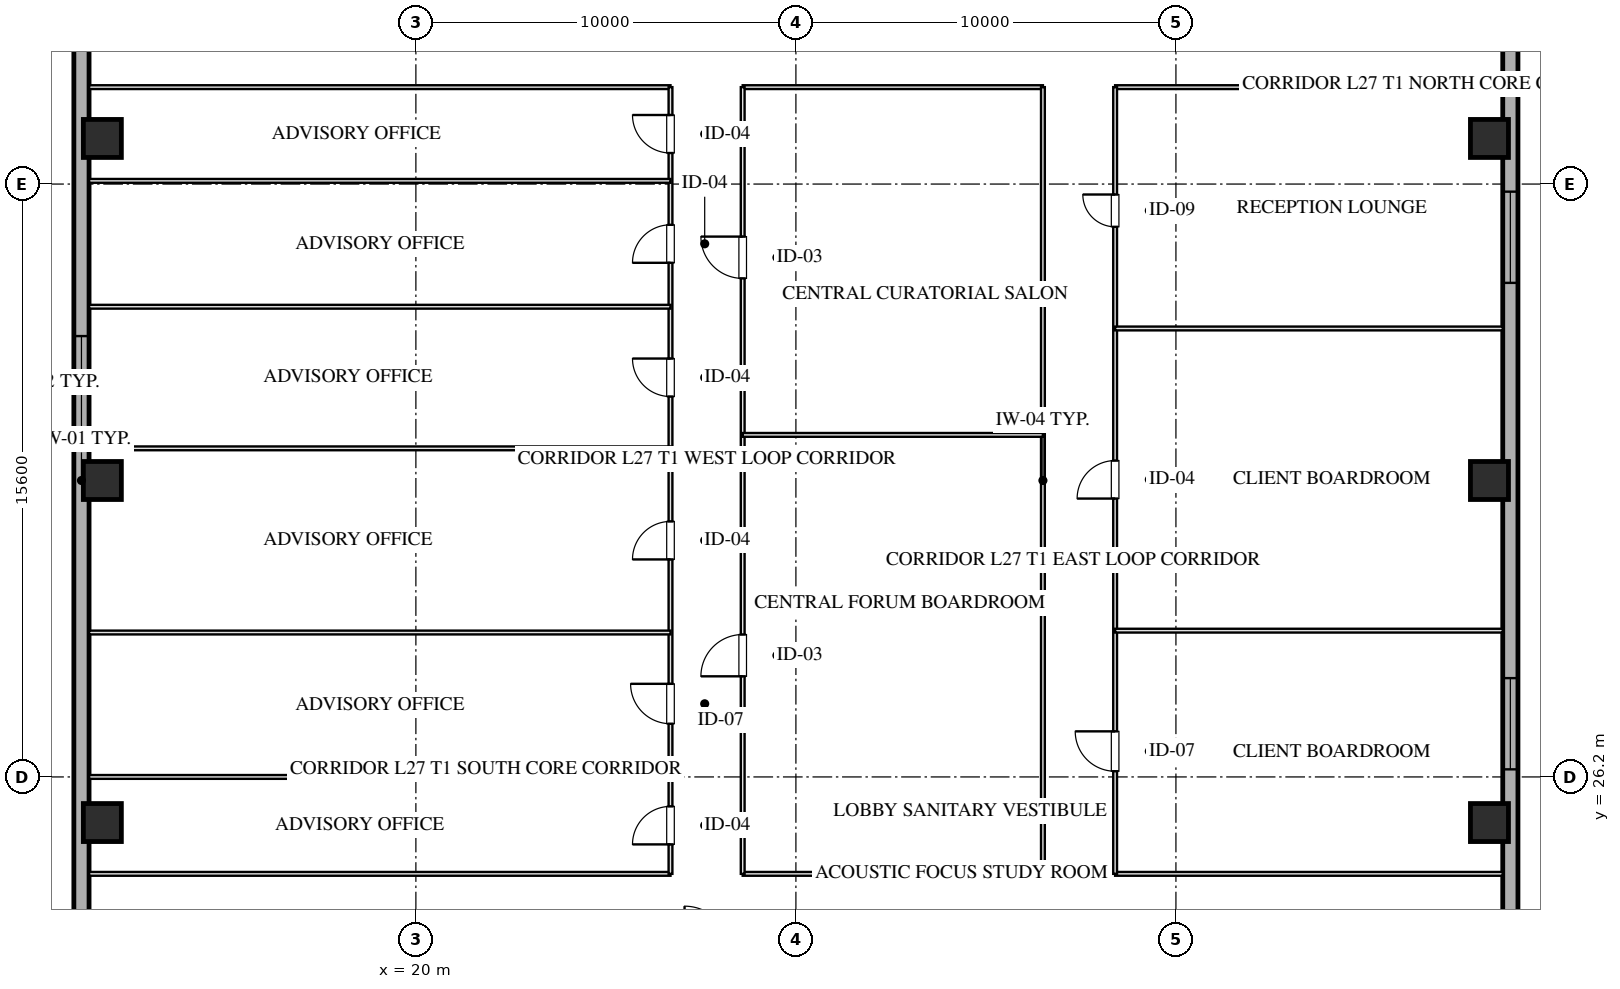
"""IFC4 building model, lengths in metres.
Left out: names, types, materials, properties, quantities, classifications, styles, units other than length and angle.
Written with IfcOpenShell. Run it as: python <this file> out.ifc"""

import sys

from ifc_helpers import new_model, si_unit, direction, frame, frame_2d, origin, origin_2d, place, context, subcontext, project, spatial, rectangle, hollow_rectangle, extrude, element, fill, save


model = new_model("IFC4")
c1 = context("Model", 3, precision=1e-05, world=origin(), true_north=direction((0.0, 1.0)))
c2 = subcontext(c1, "Body", "Model", "MODEL_VIEW")
j1 = project(units=[si_unit("LENGTHUNIT", "METRE"), si_unit("PLANEANGLEUNIT", "RADIAN")], contexts=[c1])
p1 = place(None, origin())
s1 = spatial("IfcSite", under=j1, at=p1, CompositionType="ELEMENT")
p2 = place(p1, origin())
s2 = spatial("IfcBuilding", under=s1, at=p2, CompositionType="ELEMENT")
p3 = place(p2, frame((0.0, 0.0, 106.95)))
s3 = spatial("IfcBuildingStorey", under=s2, at=p3, CompositionType="ELEMENT", Elevation=106.95)
for number, where, z_axis, x_axis in (
    (1, (11.75, 25.0, 0.0), (0.0, 0.0, 1.0), (1.0, 0.0, 0.0)),
    (2, (11.75, 34.0, 0.0), (0.0, 0.0, 1.0), (1.0, 0.0, 0.0)),
    (3, (11.75, 43.0, 0.0), (0.0, 0.0, 1.0), (1.0, 0.0, 0.0)),
    (4, (48.25, 25.0, 0.0), (0.0, 0.0, 1.0), (1.0, 0.0, 0.0)),
    (5, (48.25, 34.0, 0.0), (0.0, 0.0, 1.0), (1.0, 0.0, 0.0)),
    (6, (48.25, 43.0, 0.0), (0.0, 0.0, 1.0), (1.0, 0.0, 0.0)),
):
    element("IfcColumn", number, at=place(p3, frame(where, z_axis=z_axis, x_axis=x_axis)), inside=s3, PredefinedType="COLUMN", context=c2, shape_type="SweptSolid", body=[
        extrude(hollow_rectangle(XDim=1.0, YDim=1.0, WallThickness=0.036, at=origin_2d()), origin(), (0.0, 0.0, 1.0), 3.451),
    ])
p4 = place(p3, frame((11.2, 9.0, 0.0), z_axis=(0.0, 0.0, 1.0), x_axis=(0.0, 1.0, 0.0)))
e7 = element("IfcWall", 7, at=p4, inside=s3, PredefinedType="SOLIDWALL", context=c2, shape_type="SweptSolid", body=[
    extrude(rectangle(XDim=50.0, YDim=0.4, at=frame_2d((25.0, 0.0))), origin(), (0.0, 0.0, 1.0), 2.61),
])
p5 = place(p4, frame((26.4, 0.0, 0.75)))
e8 = element("IfcOpeningElement", 8, at=p5, cuts=e7, PredefinedType="OPENING", context=c2, shape_type="SweptSolid", body=[
    extrude(rectangle(XDim=2.4, YDim=1.46, at=frame_2d((1.2, 0.73))), frame((0.0, 0.21, 0.0), z_axis=(0.0, -1.0, 0.0), x_axis=(1.0, 0.0, 0.0)), (0.0, 0.0, 1.0), 0.42),
])
p6 = place(p3, frame((48.8, 59.0, 0.0), z_axis=(0.0, 0.0, 1.0), x_axis=(0.0, -1.0, 0.0)))
e9 = element("IfcWall", 9, at=p6, inside=s3, PredefinedType="SOLIDWALL", context=c2, shape_type="SweptSolid", body=[
    extrude(rectangle(XDim=50.0, YDim=0.4, at=frame_2d((25.0, 0.0))), origin(), (0.0, 0.0, 1.0), 2.61),
])
p7 = place(p6, frame((30.2, 0.0, 0.75)))
e10 = element("IfcOpeningElement", 10, at=p7, cuts=e9, PredefinedType="OPENING", context=c2, shape_type="SweptSolid", body=[
    extrude(rectangle(XDim=2.4, YDim=1.46, at=frame_2d((1.2, 0.73))), frame((0.0, 0.21, 0.0), z_axis=(0.0, -1.0, 0.0), x_axis=(1.0, 0.0, 0.0)), (0.0, 0.0, 1.0), 0.42),
])
p8 = place(p6, frame((17.4, 0.0, 0.75)))
e11 = element("IfcOpeningElement", 11, at=p8, cuts=e9, PredefinedType="OPENING", context=c2, shape_type="SweptSolid", body=[
    extrude(rectangle(XDim=2.4, YDim=1.46, at=frame_2d((1.2, 0.73))), frame((0.0, 0.21, 0.0), z_axis=(0.0, -1.0, 0.0), x_axis=(1.0, 0.0, 0.0)), (0.0, 0.0, 1.0), 0.42),
])
p9 = place(p3, frame((11.4, 23.65, 0.0), z_axis=(0.0, 0.0, 1.0), x_axis=(1.0, 0.0, 0.0)))
e12 = element("IfcWall", 12, at=p9, inside=s3, PredefinedType="MOVABLE", context=c2, shape_type="SweptSolid", body=[
    extrude(rectangle(XDim=15.3, YDim=0.1, at=frame_2d((7.65, 0.0))), origin(), (0.0, 0.0, 1.0), 3.175),
])
p10 = place(p3, frame((28.6, 23.65, 0.0), z_axis=(0.0, 0.0, 1.0), x_axis=(1.0, 0.0, 0.0)))
e13 = element("IfcWall", 13, at=p10, inside=s3, PredefinedType="MOVABLE", context=c2, shape_type="SweptSolid", body=[
    extrude(rectangle(XDim=7.9, YDim=0.1, at=frame_2d((3.95, 0.0))), origin(), (0.0, 0.0, 1.0), 3.175),
])
p11 = place(p3, frame((38.4, 23.65, 0.0), z_axis=(0.0, 0.0, 1.0), x_axis=(1.0, 0.0, 0.0)))
e14 = element("IfcWall", 14, at=p11, inside=s3, PredefinedType="MOVABLE", context=c2, shape_type="SweptSolid", body=[
    extrude(rectangle(XDim=10.2, YDim=0.1, at=frame_2d((5.1, 0.0))), origin(), (0.0, 0.0, 1.0), 3.175),
])
p12 = place(p3, frame((11.4, 44.35, 0.0), z_axis=(0.0, 0.0, 1.0), x_axis=(1.0, 0.0, 0.0)))
e15 = element("IfcWall", 15, at=p12, inside=s3, PredefinedType="MOVABLE", context=c2, shape_type="SweptSolid", body=[
    extrude(rectangle(XDim=15.3, YDim=0.1, at=frame_2d((7.65, 0.0))), origin(), (0.0, 0.0, 1.0), 3.175),
])
p13 = place(p3, frame((28.6, 44.35, 0.0), z_axis=(0.0, 0.0, 1.0), x_axis=(1.0, 0.0, 0.0)))
e16 = element("IfcWall", 16, at=p13, inside=s3, PredefinedType="MOVABLE", context=c2, shape_type="SweptSolid", body=[
    extrude(rectangle(XDim=7.9, YDim=0.1, at=frame_2d((3.95, 0.0))), origin(), (0.0, 0.0, 1.0), 3.175),
])
p14 = place(p3, frame((38.4, 44.35, 0.0), z_axis=(0.0, 0.0, 1.0), x_axis=(1.0, 0.0, 0.0)))
e17 = element("IfcWall", 17, at=p14, inside=s3, PredefinedType="MOVABLE", context=c2, shape_type="SweptSolid", body=[
    extrude(rectangle(XDim=10.2, YDim=0.1, at=frame_2d((5.1, 0.0))), origin(), (0.0, 0.0, 1.0), 3.175),
])
p15 = place(p3, frame((26.7, 23.65, 0.0), z_axis=(0.0, 0.0, 1.0), x_axis=(0.0, 1.0, 0.0)))
e18 = element("IfcWall", 18, at=p15, inside=s3, PredefinedType="MOVABLE", context=c2, shape_type="SweptSolid", body=[
    extrude(rectangle(XDim=20.7, YDim=0.1, at=frame_2d((10.35, 0.0))), origin(), (0.0, 0.0, 1.0), 3.175),
])
p16 = place(p15, frame((0.775, 0.0, 0.0)))
e19 = element("IfcOpeningElement", 19, at=p16, cuts=e18, PredefinedType="OPENING", context=c2, shape_type="SweptSolid", body=[
    extrude(rectangle(XDim=1.0, YDim=2.05, at=frame_2d((0.5, 1.025))), frame((0.0, 0.06, 0.0), z_axis=(0.0, -1.0, 0.0), x_axis=(1.0, 0.0, 0.0)), (0.0, 0.0, 1.0), 0.12),
])
p17 = place(p15, frame((3.95, 0.0, 0.0)))
e20 = element("IfcOpeningElement", 20, at=p17, cuts=e18, PredefinedType="OPENING", context=c2, shape_type="SweptSolid", body=[
    extrude(rectangle(XDim=1.05, YDim=2.05, at=frame_2d((0.525, 1.025))), frame((0.0, 0.06, 0.0), z_axis=(0.0, -1.0, 0.0), x_axis=(1.0, 0.0, 0.0)), (0.0, 0.0, 1.0), 0.12),
])
p18 = place(p15, frame((8.273, 0.0, 0.0)))
e21 = element("IfcOpeningElement", 21, at=p18, cuts=e18, PredefinedType="OPENING", context=c2, shape_type="SweptSolid", body=[
    extrude(rectangle(XDim=1.0, YDim=2.05, at=frame_2d((0.5, 1.025))), frame((0.0, 0.06, 0.0), z_axis=(0.0, -1.0, 0.0), x_axis=(1.0, 0.0, 0.0)), (0.0, 0.0, 1.0), 0.12),
])
p19 = place(p15, frame((12.559, 0.0, 0.0)))
e22 = element("IfcOpeningElement", 22, at=p19, cuts=e18, PredefinedType="OPENING", context=c2, shape_type="SweptSolid", body=[
    extrude(rectangle(XDim=1.0, YDim=2.05, at=frame_2d((0.5, 1.025))), frame((0.0, 0.06, 0.0), z_axis=(0.0, -1.0, 0.0), x_axis=(1.0, 0.0, 0.0)), (0.0, 0.0, 1.0), 0.12),
])
p20 = place(p15, frame((16.078, 0.0, 0.0)))
e23 = element("IfcOpeningElement", 23, at=p20, cuts=e18, PredefinedType="OPENING", context=c2, shape_type="SweptSolid", body=[
    extrude(rectangle(XDim=1.0, YDim=2.05, at=frame_2d((0.5, 1.025))), frame((0.0, 0.06, 0.0), z_axis=(0.0, -1.0, 0.0), x_axis=(1.0, 0.0, 0.0)), (0.0, 0.0, 1.0), 0.12),
])
p21 = place(p15, frame((18.967, 0.0, 0.0)))
e24 = element("IfcOpeningElement", 24, at=p21, cuts=e18, PredefinedType="OPENING", context=c2, shape_type="SweptSolid", body=[
    extrude(rectangle(XDim=1.0, YDim=2.05, at=frame_2d((0.5, 1.025))), frame((0.0, 0.06, 0.0), z_axis=(0.0, -1.0, 0.0), x_axis=(1.0, 0.0, 0.0)), (0.0, 0.0, 1.0), 0.12),
])
p22 = place(p3, frame((28.6, 23.65, 0.0), z_axis=(0.0, 0.0, 1.0), x_axis=(0.0, 1.0, 0.0)))
e25 = element("IfcWall", 25, at=p22, inside=s3, PredefinedType="MOVABLE", context=c2, shape_type="SweptSolid", body=[
    extrude(rectangle(XDim=20.7, YDim=0.1, at=frame_2d((10.35, 0.0))), origin(), (0.0, 0.0, 1.0), 3.175),
])
p23 = place(p22, frame((5.198, 0.0, 0.0)))
e26 = element("IfcOpeningElement", 26, at=p23, cuts=e25, PredefinedType="OPENING", context=c2, shape_type="SweptSolid", body=[
    extrude(rectangle(XDim=1.1, YDim=2.05, at=frame_2d((0.55, 1.025))), frame((0.0, 0.06, 0.0), z_axis=(0.0, -1.0, 0.0), x_axis=(1.0, 0.0, 0.0)), (0.0, 0.0, 1.0), 0.12),
])
p24 = place(p22, frame((15.667, 0.0, 0.0)))
e27 = element("IfcOpeningElement", 27, at=p24, cuts=e25, PredefinedType="OPENING", context=c2, shape_type="SweptSolid", body=[
    extrude(rectangle(XDim=1.1, YDim=2.05, at=frame_2d((0.55, 1.025))), frame((0.0, 0.06, 0.0), z_axis=(0.0, -1.0, 0.0), x_axis=(1.0, 0.0, 0.0)), (0.0, 0.0, 1.0), 0.12),
])
p25 = place(p3, frame((36.5, 23.65, 0.0), z_axis=(0.0, 0.0, 1.0), x_axis=(0.0, 1.0, 0.0)))
e28 = element("IfcWall", 28, at=p25, inside=s3, PredefinedType="MOVABLE", context=c2, shape_type="SweptSolid", body=[
    extrude(rectangle(XDim=20.7, YDim=0.1, at=frame_2d((10.35, 0.0))), origin(), (0.0, 0.0, 1.0), 3.175),
])
p26 = place(p3, frame((38.4, 23.65, 0.0), z_axis=(0.0, 0.0, 1.0), x_axis=(0.0, 1.0, 0.0)))
e29 = element("IfcWall", 29, at=p26, inside=s3, PredefinedType="MOVABLE", context=c2, shape_type="SweptSolid", body=[
    extrude(rectangle(XDim=20.7, YDim=0.1, at=frame_2d((10.35, 0.0))), origin(), (0.0, 0.0, 1.0), 3.175),
])
p27 = place(p26, frame((2.699, 0.0, 0.0)))
e30 = element("IfcOpeningElement", 30, at=p27, cuts=e29, PredefinedType="OPENING", context=c2, shape_type="SweptSolid", body=[
    extrude(rectangle(XDim=1.05, YDim=2.05, at=frame_2d((0.525, 1.025))), frame((0.0, 0.06, 0.0), z_axis=(0.0, -1.0, 0.0), x_axis=(1.0, 0.0, 0.0)), (0.0, 0.0, 1.0), 0.12),
])
p28 = place(p26, frame((9.875, 0.0, 0.0)))
e31 = element("IfcOpeningElement", 31, at=p28, cuts=e29, PredefinedType="OPENING", context=c2, shape_type="SweptSolid", body=[
    extrude(rectangle(XDim=1.0, YDim=2.05, at=frame_2d((0.5, 1.025))), frame((0.0, 0.06, 0.0), z_axis=(0.0, -1.0, 0.0), x_axis=(1.0, 0.0, 0.0)), (0.0, 0.0, 1.0), 0.12),
])
p29 = place(p26, frame((17.025, 0.0, 0.0)))
e32 = element("IfcOpeningElement", 32, at=p29, cuts=e29, PredefinedType="OPENING", context=c2, shape_type="SweptSolid", body=[
    extrude(rectangle(XDim=0.85, YDim=2.05, at=frame_2d((0.425, 1.025))), frame((0.0, 0.06, 0.0), z_axis=(0.0, -1.0, 0.0), x_axis=(1.0, 0.0, 0.0)), (0.0, 0.0, 1.0), 0.12),
])
p30 = place(p3, frame((28.6, 35.2, 0.0), z_axis=(0.0, 0.0, 1.0), x_axis=(1.0, 0.0, 0.0)))
e33 = element("IfcWall", 33, at=p30, inside=s3, PredefinedType="MOVABLE", context=c2, shape_type="SweptSolid", body=[
    extrude(rectangle(XDim=7.9, YDim=0.1, at=frame_2d((3.95, 0.0))), origin(), (0.0, 0.0, 1.0), 3.175),
])
for number, where, z_axis, x_axis in (
    (34, (11.4, 26.2, 0.0), (0.0, 0.0, 1.0), (1.0, 0.0, 0.0)),
    (35, (11.4, 30.0, 0.0), (0.0, 0.0, 1.0), (1.0, 0.0, 0.0)),
    (36, (11.4, 34.846, 0.0), (0.0, 0.0, 1.0), (1.0, 0.0, 0.0)),
    (37, (11.4, 38.572, 0.0), (0.0, 0.0, 1.0), (1.0, 0.0, 0.0)),
    (38, (11.4, 41.884, 0.0), (0.0, 0.0, 1.0), (1.0, 0.0, 0.0)),
):
    element("IfcWall", number, at=place(p3, frame(where, z_axis=z_axis, x_axis=x_axis)), inside=s3, PredefinedType="MOVABLE", context=c2, shape_type="SweptSolid", body=[
        extrude(rectangle(XDim=15.3, YDim=0.1, at=frame_2d((7.65, 0.0))), origin(), (0.0, 0.0, 1.0), 3.175),
    ])
for number, where, z_axis, x_axis in (
    (39, (38.4, 30.049, 0.0), (0.0, 0.0, 1.0), (1.0, 0.0, 0.0)),
    (40, (38.4, 38.0, 0.0), (0.0, 0.0, 1.0), (1.0, 0.0, 0.0)),
):
    element("IfcWall", number, at=place(p3, frame(where, z_axis=z_axis, x_axis=x_axis)), inside=s3, PredefinedType="MOVABLE", context=c2, shape_type="SweptSolid", body=[
        extrude(rectangle(XDim=10.2, YDim=0.1, at=frame_2d((5.1, 0.0))), origin(), (0.0, 0.0, 1.0), 3.175),
    ])
p31 = place(p5, origin())
e41 = element("IfcWindow", 41, at=p31, inside=s3, PartitioningType="TRIPLE_PANEL_VERTICAL", PredefinedType="WINDOW", context=c2, shape_type="SweptSolid", body=[
    extrude(rectangle(XDim=2.4, YDim=1.46, at=frame_2d((1.2, 0.73))), frame((0.0, 0.03, 0.0), z_axis=(0.0, -1.0, 0.0), x_axis=(1.0, 0.0, 0.0)), (0.0, 0.0, 1.0), 0.06),
])
fill(e8, e41)
p32 = place(p7, origin())
e42 = element("IfcWindow", 42, at=p32, inside=s3, PartitioningType="TRIPLE_PANEL_VERTICAL", PredefinedType="WINDOW", context=c2, shape_type="SweptSolid", body=[
    extrude(rectangle(XDim=2.4, YDim=1.46, at=frame_2d((1.2, 0.73))), frame((0.0, 0.03, 0.0), z_axis=(0.0, -1.0, 0.0), x_axis=(1.0, 0.0, 0.0)), (0.0, 0.0, 1.0), 0.06),
])
fill(e10, e42)
p33 = place(p8, origin())
e43 = element("IfcWindow", 43, at=p33, inside=s3, PartitioningType="TRIPLE_PANEL_VERTICAL", PredefinedType="WINDOW", context=c2, shape_type="SweptSolid", body=[
    extrude(rectangle(XDim=2.4, YDim=1.46, at=frame_2d((1.2, 0.73))), frame((0.0, 0.03, 0.0), z_axis=(0.0, -1.0, 0.0), x_axis=(1.0, 0.0, 0.0)), (0.0, 0.0, 1.0), 0.06),
])
fill(e11, e43)
p34 = place(p16, origin())
e44 = element("IfcDoor", 44, at=p34, inside=s3, OperationType="SINGLE_SWING_LEFT", PredefinedType="DOOR", context=c2, shape_type="SweptSolid", body=[
    extrude(rectangle(XDim=1.0, YDim=2.05, at=frame_2d((0.5, 1.025))), frame((0.0, 0.025, 0.0), z_axis=(0.0, -1.0, 0.0), x_axis=(1.0, 0.0, 0.0)), (0.0, 0.0, 1.0), 0.05),
])
fill(e19, e44)
p35 = place(p17, origin())
e45 = element("IfcDoor", 45, at=p35, inside=s3, OperationType="SINGLE_SWING_RIGHT", PredefinedType="DOOR", context=c2, shape_type="SweptSolid", body=[
    extrude(rectangle(XDim=1.05, YDim=2.05, at=frame_2d((0.525, 1.025))), frame((0.0, 0.025, 0.0), z_axis=(0.0, -1.0, 0.0), x_axis=(1.0, 0.0, 0.0)), (0.0, 0.0, 1.0), 0.05),
])
fill(e20, e45)
p36 = place(p18, origin())
e46 = element("IfcDoor", 46, at=p36, inside=s3, OperationType="SINGLE_SWING_LEFT", PredefinedType="DOOR", context=c2, shape_type="SweptSolid", body=[
    extrude(rectangle(XDim=1.0, YDim=2.05, at=frame_2d((0.5, 1.025))), frame((0.0, 0.025, 0.0), z_axis=(0.0, -1.0, 0.0), x_axis=(1.0, 0.0, 0.0)), (0.0, 0.0, 1.0), 0.05),
])
fill(e21, e46)
p37 = place(p19, origin())
e47 = element("IfcDoor", 47, at=p37, inside=s3, OperationType="SINGLE_SWING_RIGHT", PredefinedType="DOOR", context=c2, shape_type="SweptSolid", body=[
    extrude(rectangle(XDim=1.0, YDim=2.05, at=frame_2d((0.5, 1.025))), frame((0.0, 0.025, 0.0), z_axis=(0.0, -1.0, 0.0), x_axis=(1.0, 0.0, 0.0)), (0.0, 0.0, 1.0), 0.05),
])
fill(e22, e47)
p38 = place(p20, origin())
e48 = element("IfcDoor", 48, at=p38, inside=s3, OperationType="SINGLE_SWING_LEFT", PredefinedType="DOOR", context=c2, shape_type="SweptSolid", body=[
    extrude(rectangle(XDim=1.0, YDim=2.05, at=frame_2d((0.5, 1.025))), frame((0.0, 0.025, 0.0), z_axis=(0.0, -1.0, 0.0), x_axis=(1.0, 0.0, 0.0)), (0.0, 0.0, 1.0), 0.05),
])
fill(e23, e48)
p39 = place(p21, origin())
e49 = element("IfcDoor", 49, at=p39, inside=s3, OperationType="SINGLE_SWING_RIGHT", PredefinedType="DOOR", context=c2, shape_type="SweptSolid", body=[
    extrude(rectangle(XDim=1.0, YDim=2.05, at=frame_2d((0.5, 1.025))), frame((0.0, 0.025, 0.0), z_axis=(0.0, -1.0, 0.0), x_axis=(1.0, 0.0, 0.0)), (0.0, 0.0, 1.0), 0.05),
])
fill(e24, e49)
p40 = place(p23, origin())
e50 = element("IfcDoor", 50, at=p40, inside=s3, OperationType="SINGLE_SWING_LEFT", PredefinedType="DOOR", context=c2, shape_type="SweptSolid", body=[
    extrude(rectangle(XDim=1.1, YDim=2.05, at=frame_2d((0.55, 1.025))), frame((0.0, 0.025, 0.0), z_axis=(0.0, -1.0, 0.0), x_axis=(1.0, 0.0, 0.0)), (0.0, 0.0, 1.0), 0.05),
])
fill(e26, e50)
p41 = place(p24, origin())
e51 = element("IfcDoor", 51, at=p41, inside=s3, OperationType="SINGLE_SWING_RIGHT", PredefinedType="DOOR", context=c2, shape_type="SweptSolid", body=[
    extrude(rectangle(XDim=1.1, YDim=2.05, at=frame_2d((0.55, 1.025))), frame((0.0, 0.025, 0.0), z_axis=(0.0, -1.0, 0.0), x_axis=(1.0, 0.0, 0.0)), (0.0, 0.0, 1.0), 0.05),
])
fill(e27, e51)
p42 = place(p27, origin())
e52 = element("IfcDoor", 52, at=p42, inside=s3, OperationType="SINGLE_SWING_RIGHT", PredefinedType="DOOR", context=c2, shape_type="SweptSolid", body=[
    extrude(rectangle(XDim=1.05, YDim=2.05, at=frame_2d((0.525, 1.025))), frame((0.0, 0.025, 0.0), z_axis=(0.0, -1.0, 0.0), x_axis=(1.0, 0.0, 0.0)), (0.0, 0.0, 1.0), 0.05),
])
fill(e30, e52)
p43 = place(p28, origin())
e53 = element("IfcDoor", 53, at=p43, inside=s3, OperationType="SINGLE_SWING_LEFT", PredefinedType="DOOR", context=c2, shape_type="SweptSolid", body=[
    extrude(rectangle(XDim=1.0, YDim=2.05, at=frame_2d((0.5, 1.025))), frame((0.0, 0.025, 0.0), z_axis=(0.0, -1.0, 0.0), x_axis=(1.0, 0.0, 0.0)), (0.0, 0.0, 1.0), 0.05),
])
fill(e31, e53)
p44 = place(p29, origin())
e54 = element("IfcDoor", 54, at=p44, inside=s3, OperationType="SINGLE_SWING_RIGHT", PredefinedType="DOOR", context=c2, shape_type="SweptSolid", body=[
    extrude(rectangle(XDim=0.85, YDim=2.05, at=frame_2d((0.425, 1.025))), frame((0.0, 0.025, 0.0), z_axis=(0.0, -1.0, 0.0), x_axis=(1.0, 0.0, 0.0)), (0.0, 0.0, 1.0), 0.05),
])
fill(e32, e54)
save(model, sys.argv[1])
